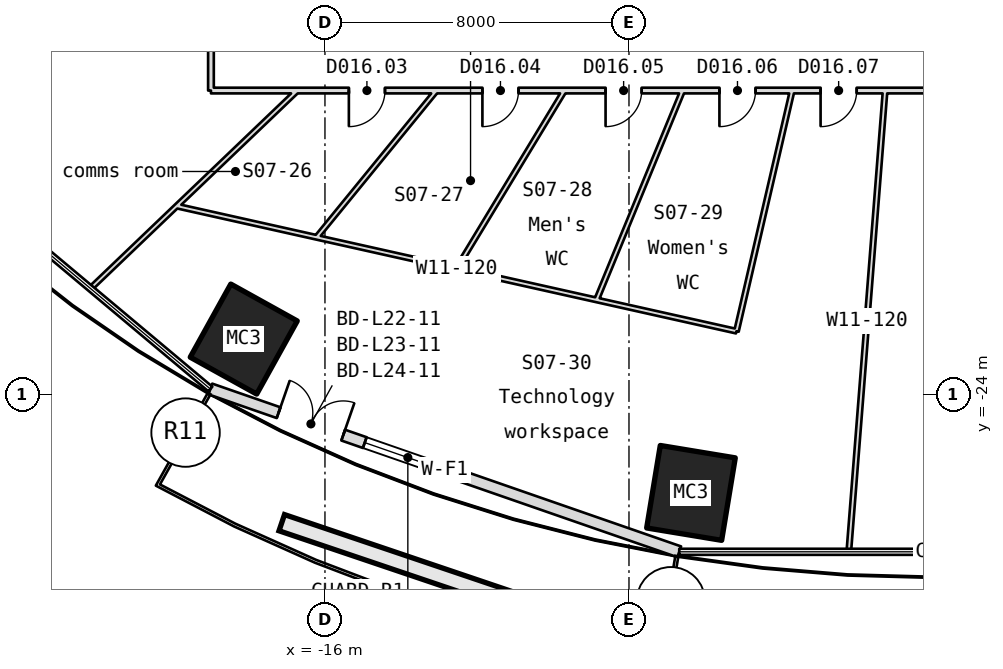
"""IFC4 building model, lengths in metres.
Left out: names, types, materials, properties, quantities, classifications, styles, units other than length and angle.
Written with IfcOpenShell. Run it as: python <this file> out.ifc"""

import sys

from ifc_helpers import new_model, si_unit, direction, frame, frame_2d, origin, origin_2d, place, context, subcontext, project, spatial, rectangle, hollow_rectangle, extrude, element, fill, save


model = new_model("IFC4")
c1 = context("Model", 3, precision=1e-05, world=origin(), true_north=direction((0.0, 1.0)))
c2 = subcontext(c1, "Body", "Model", "MODEL_VIEW")
j1 = project(units=[si_unit("LENGTHUNIT", "METRE"), si_unit("PLANEANGLEUNIT", "RADIAN")], contexts=[c1])
p1 = place(None, origin())
s1 = spatial("IfcSite", under=j1, at=p1, CompositionType="ELEMENT")
p2 = place(p1, origin())
s2 = spatial("IfcBuilding", under=s1, at=p2, CompositionType="ELEMENT")
p3 = place(p2, frame((0.0, 0.0, 107.7)))
s3 = spatial("IfcBuildingStorey", under=s2, at=p3, CompositionType="ELEMENT", Elevation=107.7)
for number, where, z_axis, x_axis in (
    (1, (-18.137, -22.54, -0.18), (0.0, 0.0, 1.0), (-0.874, 0.485, 0.0)),
    (2, (-6.369, -26.587, -0.18), (0.0, 0.0, 1.0), (-0.987, 0.163, 0.0)),
):
    element("IfcColumn", number, at=place(p3, frame(where, z_axis=z_axis, x_axis=x_axis)), inside=s3, PredefinedType="COLUMN", context=c2, shape_type="SweptSolid", body=[
        extrude(hollow_rectangle(XDim=2.0, YDim=2.2, WallThickness=0.08, at=origin_2d()), origin(), (0.0, 0.0, 1.0), 4.15),
    ])
p4 = place(p3, frame((-19.015, -23.853, 0.0), z_axis=(0.0, 0.0, 1.0), x_axis=(0.944684524645, -0.327980409318, 0.0)))
e3 = element("IfcWall", 3, at=p4, inside=s3, PredefinedType="SOLIDWALL", context=c2, shape_type="SweptSolid", body=[
    extrude(rectangle(XDim=13.06, YDim=0.3, at=frame_2d((6.53, 0.0))), origin(), (0.0, 0.0, 1.0), 3.97),
])
p5 = place(p4, frame((1.9, 0.0, 0.0)))
e4 = element("IfcOpeningElement", 4, at=p5, cuts=e3, PredefinedType="OPENING", context=c2, shape_type="SweptSolid", body=[
    extrude(rectangle(XDim=1.8, YDim=2.4, at=frame_2d((0.9, 1.2))), frame((0.0, 0.16, 0.0), z_axis=(0.0, -1.0, 0.0), x_axis=(1.0, 0.0, 0.0)), (0.0, 0.0, 1.0), 0.32),
])
p6 = place(p4, frame((4.3, 0.0, 0.9)))
e5 = element("IfcOpeningElement", 5, at=p6, cuts=e3, PredefinedType="OPENING", context=c2, shape_type="SweptSolid", body=[
    extrude(rectangle(XDim=2.4, YDim=1.5, at=frame_2d((1.2, 0.75))), frame((0.0, 0.16, 0.0), z_axis=(0.0, -1.0, 0.0), x_axis=(1.0, 0.0, 0.0)), (0.0, 0.0, 1.0), 0.32),
])
p7 = place(p3, frame((-19.903, -19.039, 0.0), z_axis=(0.0, 0.0, 1.0), x_axis=(0.975911899849, -0.218164991996, 0.0)))
e6 = element("IfcWall", 6, at=p7, inside=s3, PredefinedType="PARTITIONING", context=c2, shape_type="SweptSolid", body=[
    extrude(rectangle(XDim=15.095, YDim=0.12, at=frame_2d((7.547, 0.0))), origin(), (0.0, 0.0, 1.0), 3.97),
])
p8 = place(p3, frame((-19.0, -16.0, 0.0), z_axis=(0.0, 0.0, 1.0), x_axis=(0.0, 1.0, 0.0)))
e7 = element("IfcWall", 7, at=p8, inside=s3, PredefinedType="PARTITIONING", context=c2, shape_type="SweptSolid", body=[
    extrude(rectangle(XDim=32.0, YDim=0.15, at=frame_2d((16.0, 0.0))), origin(), (0.0, 0.0, 1.0), 3.97),
])
p9 = place(p8, frame((15.1, 0.0, 0.0)))
e8 = element("IfcOpeningElement", 8, at=p9, cuts=e7, PredefinedType="OPENING", context=c2, shape_type="SweptSolid", body=[
    extrude(rectangle(XDim=1.8, YDim=2.1, at=frame_2d((0.9, 1.05))), frame((0.0, 0.085, 0.0), z_axis=(0.0, -1.0, 0.0), x_axis=(1.0, 0.0, 0.0)), (0.0, 0.0, 1.0), 0.17),
])
p10 = place(p3, frame((-16.726, -16.0, 0.0), z_axis=(0.0, 0.0, 1.0), x_axis=(-0.722599633889, -0.691266785767, 0.0)))
e9 = element("IfcWall", 9, at=p10, inside=s3, PredefinedType="PARTITIONING", context=c2, shape_type="SweptSolid", body=[
    extrude(rectangle(XDim=7.535, YDim=0.12, at=frame_2d((3.767, 0.0))), origin(), (0.0, 0.0, 1.0), 3.97),
])
p11 = place(p3, frame((-16.22, -19.863, 0.0), z_axis=(0.0, 0.0, 1.0), x_axis=(0.632491004323, 0.774567704884, 0.0)))
e10 = element("IfcWall", 10, at=p11, inside=s3, PredefinedType="PARTITIONING", context=c2, shape_type="SweptSolid", body=[
    extrude(rectangle(XDim=4.987, YDim=0.12, at=frame_2d((2.493, 0.0))), origin(), (0.0, 0.0, 1.0), 3.97),
])
p12 = place(p3, frame((-12.537, -20.686, 0.0), z_axis=(0.0, 0.0, 1.0), x_axis=(0.518297766023, 0.855200225523, 0.0)))
e11 = element("IfcWall", 11, at=p12, inside=s3, PredefinedType="PARTITIONING", context=c2, shape_type="SweptSolid", body=[
    extrude(rectangle(XDim=5.479, YDim=0.12, at=frame_2d((2.74, 0.0))), origin(), (0.0, 0.0, 1.0), 3.97),
])
p13 = place(p3, frame((-8.854, -21.509, 0.0), z_axis=(0.0, 0.0, 1.0), x_axis=(0.380663236363, 0.92471373975, 0.0)))
e12 = element("IfcWall", 12, at=p13, inside=s3, PredefinedType="PARTITIONING", context=c2, shape_type="SweptSolid", body=[
    extrude(rectangle(XDim=5.958, YDim=0.12, at=frame_2d((2.979, 0.0))), origin(), (0.0, 0.0, 1.0), 3.426),
])
p14 = place(p3, frame((-5.171, -22.333, 0.0), z_axis=(0.0, 0.0, 1.0), x_axis=(0.225583629602, 0.974223806964, 0.0)))
e13 = element("IfcWall", 13, at=p14, inside=s3, PredefinedType="PARTITIONING", context=c2, shape_type="SweptSolid", body=[
    extrude(rectangle(XDim=6.5, YDim=0.12, at=frame_2d((3.25, 0.0))), origin(), (0.0, 0.0, 1.0), 3.97),
])
p15 = place(p3, frame((-1.26, -16.0, 0.0), z_axis=(0.0, 0.0, 1.0), x_axis=(-0.078510530824, -0.996913284368, 0.0)))
e14 = element("IfcWall", 14, at=p15, inside=s3, PredefinedType="PARTITIONING", context=c2, shape_type="SweptSolid", body=[
    extrude(rectangle(XDim=12.174, YDim=0.12, at=frame_2d((6.087, 0.0))), origin(), (0.0, 0.0, 1.0), 3.97),
])
p16 = place(p3, frame((19.0, -16.0, 0.0), z_axis=(0.0, 0.0, 1.0), x_axis=(-1.0, 0.0, 0.0)))
e15 = element("IfcWall", 15, at=p16, inside=s3, PredefinedType="PARTITIONING", context=c2, shape_type="SweptSolid", body=[
    extrude(rectangle(XDim=38.0, YDim=0.15, at=frame_2d((19.0, 0.0))), origin(), (0.0, 0.0, 1.0), 3.97),
])
p17 = place(p16, frame((33.421, 0.0, 0.0)))
e16 = element("IfcOpeningElement", 16, at=p17, cuts=e15, PredefinedType="OPENING", context=c2, shape_type="SweptSolid", body=[
    extrude(rectangle(XDim=0.95, YDim=2.1, at=frame_2d((0.475, 1.05))), frame((0.0, 0.085, 0.0), z_axis=(0.0, -1.0, 0.0), x_axis=(1.0, 0.0, 0.0)), (0.0, 0.0, 1.0), 0.17),
])
p18 = place(p16, frame((29.907, 0.0, 0.0)))
e17 = element("IfcOpeningElement", 17, at=p18, cuts=e15, PredefinedType="OPENING", context=c2, shape_type="SweptSolid", body=[
    extrude(rectangle(XDim=0.95, YDim=2.1, at=frame_2d((0.475, 1.05))), frame((0.0, 0.085, 0.0), z_axis=(0.0, -1.0, 0.0), x_axis=(1.0, 0.0, 0.0)), (0.0, 0.0, 1.0), 0.17),
])
p19 = place(p16, frame((26.666, 0.0, 0.0)))
e18 = element("IfcOpeningElement", 18, at=p19, cuts=e15, PredefinedType="OPENING", context=c2, shape_type="SweptSolid", body=[
    extrude(rectangle(XDim=0.95, YDim=2.1, at=frame_2d((0.475, 1.05))), frame((0.0, 0.085, 0.0), z_axis=(0.0, -1.0, 0.0), x_axis=(1.0, 0.0, 0.0)), (0.0, 0.0, 1.0), 0.17),
])
p20 = place(p16, frame((23.67, 0.0, 0.0)))
e19 = element("IfcOpeningElement", 19, at=p20, cuts=e15, PredefinedType="OPENING", context=c2, shape_type="SweptSolid", body=[
    extrude(rectangle(XDim=0.95, YDim=2.1, at=frame_2d((0.475, 1.05))), frame((0.0, 0.085, 0.0), z_axis=(0.0, -1.0, 0.0), x_axis=(1.0, 0.0, 0.0)), (0.0, 0.0, 1.0), 0.17),
])
p21 = place(p16, frame((21.008, 0.0, 0.0)))
e20 = element("IfcOpeningElement", 20, at=p21, cuts=e15, PredefinedType="OPENING", context=c2, shape_type="SweptSolid", body=[
    extrude(rectangle(XDim=0.95, YDim=2.1, at=frame_2d((0.475, 1.05))), frame((0.0, 0.085, 0.0), z_axis=(0.0, -1.0, 0.0), x_axis=(1.0, 0.0, 0.0)), (0.0, 0.0, 1.0), 0.17),
])
p22 = place(p16, frame((6.912, 0.0, 0.0)))
e21 = element("IfcOpeningElement", 21, at=p22, cuts=e15, PredefinedType="OPENING", context=c2, shape_type="SweptSolid", body=[
    extrude(rectangle(XDim=0.95, YDim=2.1, at=frame_2d((0.475, 1.05))), frame((0.0, 0.085, 0.0), z_axis=(0.0, -1.0, 0.0), x_axis=(1.0, 0.0, 0.0)), (0.0, 0.0, 1.0), 0.17),
])
p23 = place(p16, frame((15.848, 0.0, 0.0)))
e22 = element("IfcOpeningElement", 22, at=p23, cuts=e15, PredefinedType="OPENING", context=c2, shape_type="SweptSolid", body=[
    extrude(rectangle(XDim=1.8, YDim=2.1, at=frame_2d((0.9, 1.05))), frame((0.0, 0.085, 0.0), z_axis=(0.0, -1.0, 0.0), x_axis=(1.0, 0.0, 0.0)), (0.0, 0.0, 1.0), 0.17),
])
p24 = place(p5, origin())
e23 = element("IfcDoor", 23, at=p24, inside=s3, OperationType="SINGLE_SWING_LEFT", PredefinedType="DOOR", context=c2, shape_type="SweptSolid", body=[
    extrude(rectangle(XDim=1.8, YDim=2.4, at=frame_2d((0.9, 1.2))), frame((0.0, 0.025, 0.0), z_axis=(0.0, -1.0, 0.0), x_axis=(1.0, 0.0, 0.0)), (0.0, 0.0, 1.0), 0.05),
])
fill(e4, e23)
p25 = place(p6, origin())
e24 = element("IfcWindow", 24, at=p25, inside=s3, PartitioningType="SINGLE_PANEL", PredefinedType="WINDOW", context=c2, shape_type="SweptSolid", body=[
    extrude(rectangle(XDim=2.4, YDim=1.5, at=frame_2d((1.2, 0.75))), frame((0.0, 0.03, 0.0), z_axis=(0.0, -1.0, 0.0), x_axis=(1.0, 0.0, 0.0)), (0.0, 0.0, 1.0), 0.06),
])
fill(e5, e24)
p26 = place(p17, origin())
e25 = element("IfcDoor", 25, at=p26, inside=s3, OperationType="SINGLE_SWING_RIGHT", PredefinedType="DOOR", context=c2, shape_type="SweptSolid", body=[
    extrude(rectangle(XDim=0.95, YDim=2.1, at=frame_2d((0.475, 1.05))), frame((0.0, 0.025, 0.0), z_axis=(0.0, -1.0, 0.0), x_axis=(1.0, 0.0, 0.0)), (0.0, 0.0, 1.0), 0.05),
])
fill(e16, e25)
p27 = place(p18, origin())
e26 = element("IfcDoor", 26, at=p27, inside=s3, OperationType="SINGLE_SWING_RIGHT", PredefinedType="DOOR", context=c2, shape_type="SweptSolid", body=[
    extrude(rectangle(XDim=0.95, YDim=2.1, at=frame_2d((0.475, 1.05))), frame((0.0, 0.025, 0.0), z_axis=(0.0, -1.0, 0.0), x_axis=(1.0, 0.0, 0.0)), (0.0, 0.0, 1.0), 0.05),
])
fill(e17, e26)
p28 = place(p19, origin())
e27 = element("IfcDoor", 27, at=p28, inside=s3, OperationType="SINGLE_SWING_RIGHT", PredefinedType="DOOR", context=c2, shape_type="SweptSolid", body=[
    extrude(rectangle(XDim=0.95, YDim=2.1, at=frame_2d((0.475, 1.05))), frame((0.0, 0.025, 0.0), z_axis=(0.0, -1.0, 0.0), x_axis=(1.0, 0.0, 0.0)), (0.0, 0.0, 1.0), 0.05),
])
fill(e18, e27)
p29 = place(p20, origin())
e28 = element("IfcDoor", 28, at=p29, inside=s3, OperationType="SINGLE_SWING_RIGHT", PredefinedType="DOOR", context=c2, shape_type="SweptSolid", body=[
    extrude(rectangle(XDim=0.95, YDim=2.1, at=frame_2d((0.475, 1.05))), frame((0.0, 0.025, 0.0), z_axis=(0.0, -1.0, 0.0), x_axis=(1.0, 0.0, 0.0)), (0.0, 0.0, 1.0), 0.05),
])
fill(e19, e28)
p30 = place(p21, origin())
e29 = element("IfcDoor", 29, at=p30, inside=s3, OperationType="SINGLE_SWING_RIGHT", PredefinedType="DOOR", context=c2, shape_type="SweptSolid", body=[
    extrude(rectangle(XDim=0.95, YDim=2.1, at=frame_2d((0.475, 1.05))), frame((0.0, 0.025, 0.0), z_axis=(0.0, -1.0, 0.0), x_axis=(1.0, 0.0, 0.0)), (0.0, 0.0, 1.0), 0.05),
])
fill(e20, e29)
save(model, sys.argv[1])
